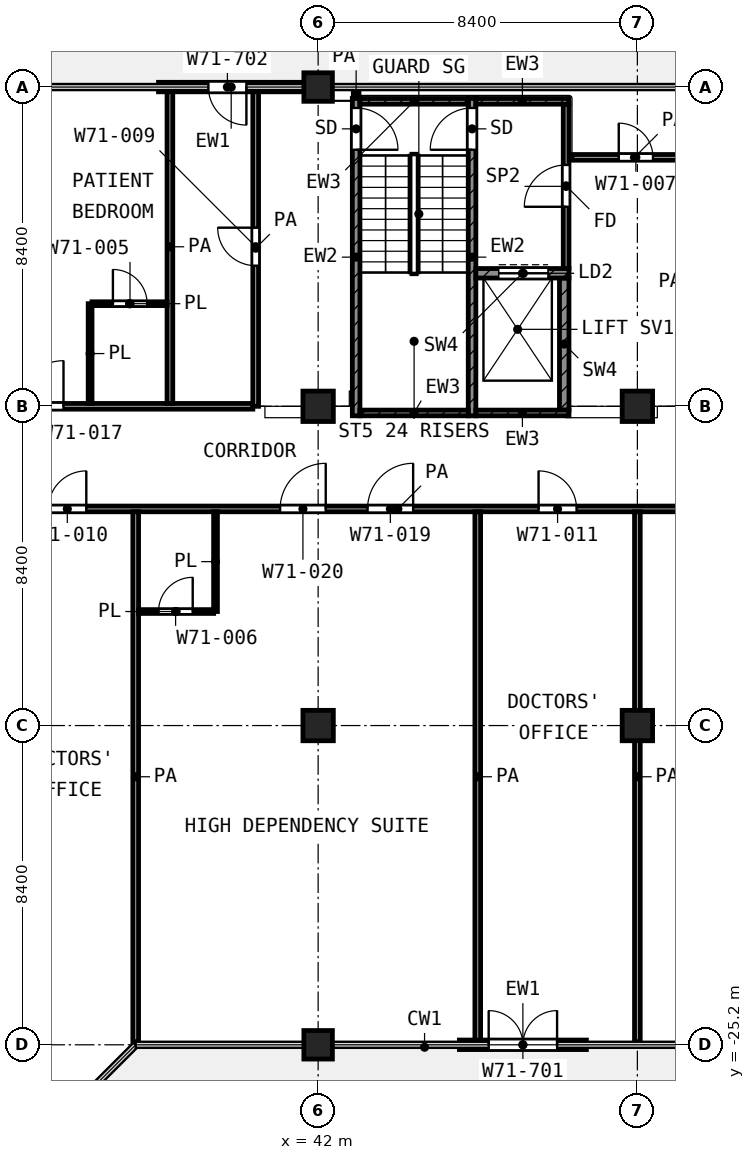
"""IFC4 building model, lengths in metres.
Left out: names, types, materials, properties, quantities, classifications, styles, units other than length and angle.
Written with IfcOpenShell. Run it as: python <this file> out.ifc"""

import sys

from ifc_helpers import new_model, si_unit, direction, frame, frame_2d, origin, origin_2d, place, context, subcontext, project, spatial, rectangle, extrude, element, fill, save


model = new_model("IFC4")
c1 = context("Model", 3, precision=1e-05, world=origin(), true_north=direction((0.0, 1.0)))
c2 = subcontext(c1, "Body", "Model", "MODEL_VIEW")
j1 = project(units=[si_unit("LENGTHUNIT", "METRE"), si_unit("PLANEANGLEUNIT", "RADIAN")], contexts=[c1])
p1 = place(None, origin())
s1 = spatial("IfcSite", under=j1, at=p1, CompositionType="ELEMENT")
p2 = place(p1, origin())
s2 = spatial("IfcBuilding", under=s1, at=p2, CompositionType="ELEMENT")
p3 = place(p2, frame((0.0, 0.0, 328.0)))
s3 = spatial("IfcBuildingStorey", under=s2, at=p3, CompositionType="ELEMENT", Elevation=328.0)
p4 = place(p3, frame((42.0, 0.0, 0.0), z_axis=(0.0, 0.0, 1.0), x_axis=(1.0, 0.0, 0.0)))
e1 = element("IfcColumn", 1, at=p4, inside=s3, PredefinedType="COLUMN", context=c2, shape_type="SweptSolid", body=[
    extrude(rectangle(XDim=0.75, YDim=0.75, at=origin_2d()), origin(), (0.0, 0.0, 1.0), 4.2),
])
for number, where, z_axis, x_axis in (
    (2, (42.0, -8.4, 0.0), (0.0, 0.0, 1.0), (1.0, 0.0, 0.0)),
    (3, (50.4, -8.4, 0.0), (0.0, 0.0, 1.0), (1.0, 0.0, 0.0)),
    (4, (42.0, -16.8, 0.0), (0.0, 0.0, 1.0), (1.0, 0.0, 0.0)),
    (5, (50.4, -16.8, 0.0), (0.0, 0.0, 1.0), (1.0, 0.0, 0.0)),
):
    element("IfcColumn", number, at=place(p3, frame(where, z_axis=z_axis, x_axis=x_axis)), inside=s3, PredefinedType="COLUMN", context=c2, shape_type="SweptSolid", body=[
        extrude(rectangle(XDim=0.8, YDim=0.8, at=origin_2d()), origin(), (0.0, 0.0, 1.0), 4.2),
    ])
p5 = place(p3, frame((42.0, -25.2, 0.0), z_axis=(0.0, 0.0, 1.0), x_axis=(1.0, 0.0, 0.0)))
e6 = element("IfcColumn", 6, at=p5, inside=s3, PredefinedType="COLUMN", context=c2, shape_type="SweptSolid", body=[
    extrude(rectangle(XDim=0.75, YDim=0.75, at=origin_2d()), origin(), (0.0, 0.0, 1.0), 4.2),
])
p6 = place(p3, frame((45.717, -25.2, 0.0), z_axis=(0.0, 0.0, 1.0), x_axis=(1.0, 0.0, 0.0)))
e7 = element("IfcWall", 7, at=p6, inside=s3, PredefinedType="SOLIDWALL", context=c2, shape_type="SweptSolid", body=[
    extrude(rectangle(XDim=3.342, YDim=0.25, at=frame_2d((1.671, 0.0))), origin(), (0.0, 0.0, 1.0), 3.66),
])
p7 = place(p6, frame((0.771, 0.0, 0.0)))
e8 = element("IfcOpeningElement", 8, at=p7, cuts=e7, PredefinedType="OPENING", context=c2, shape_type="SweptSolid", body=[
    extrude(rectangle(XDim=1.8, YDim=2.1, at=frame_2d((0.9, 1.05))), frame((0.0, 0.135, 0.0), z_axis=(0.0, -1.0, 0.0), x_axis=(1.0, 0.0, 0.0)), (0.0, 0.0, 1.0), 0.27),
])
p8 = place(p3, frame((41.625, 0.0, 0.0), z_axis=(0.0, 0.0, 1.0), x_axis=(-1.0, 0.0, 0.0)))
e9 = element("IfcWall", 9, at=p8, inside=s3, PredefinedType="SOLIDWALL", context=c2, shape_type="SweptSolid", body=[
    extrude(rectangle(XDim=3.825, YDim=0.25, at=frame_2d((1.913, 0.0))), origin(), (0.0, 0.0, 1.0), 3.66),
])
p9 = place(p8, frame((1.512, 0.0, 0.0)))
e10 = element("IfcOpeningElement", 10, at=p9, cuts=e9, PredefinedType="OPENING", context=c2, shape_type="SweptSolid", body=[
    extrude(rectangle(XDim=1.0, YDim=2.1, at=frame_2d((0.5, 1.05))), frame((0.0, 0.135, 0.0), z_axis=(0.0, -1.0, 0.0), x_axis=(1.0, 0.0, 0.0)), (0.0, 0.0, 1.0), 0.27),
])
p10 = place(p3, frame((43.0, -8.65, 0.0), z_axis=(0.0, 0.0, 1.0), x_axis=(0.0, 1.0, 0.0)))
e11 = element("IfcWall", 11, at=p10, inside=s3, PredefinedType="SHEAR", context=c2, shape_type="SweptSolid", body=[
    extrude(rectangle(XDim=8.35, YDim=0.2, at=frame_2d((4.175, 0.0))), origin(), (0.0, 0.0, 1.0), 3.78),
])
p11 = place(p10, frame((7.0, 0.0, 0.0)))
e12 = element("IfcOpeningElement", 12, at=p11, cuts=e11, PredefinedType="OPENING", context=c2, shape_type="SweptSolid", body=[
    extrude(rectangle(XDim=1.1, YDim=2.1, at=frame_2d((0.55, 1.05))), frame((0.0, 0.11, 0.0), z_axis=(0.0, -1.0, 0.0), x_axis=(1.0, 0.0, 0.0)), (0.0, 0.0, 1.0), 0.22),
])
p12 = place(p3, frame((46.05, -8.65, 0.0), z_axis=(0.0, 0.0, 1.0), x_axis=(0.0, 1.0, 0.0)))
e13 = element("IfcWall", 13, at=p12, inside=s3, PredefinedType="SHEAR", context=c2, shape_type="SweptSolid", body=[
    extrude(rectangle(XDim=8.35, YDim=0.2, at=frame_2d((4.175, 0.0))), origin(), (0.0, 0.0, 1.0), 3.78),
])
p13 = place(p12, frame((7.0, 0.0, 0.0)))
e14 = element("IfcOpeningElement", 14, at=p13, cuts=e13, PredefinedType="OPENING", context=c2, shape_type="SweptSolid", body=[
    extrude(rectangle(XDim=1.1, YDim=2.1, at=frame_2d((0.55, 1.05))), frame((0.0, 0.11, 0.0), z_axis=(0.0, -1.0, 0.0), x_axis=(1.0, 0.0, 0.0)), (0.0, 0.0, 1.0), 0.22),
])
p14 = place(p3, frame((43.1, -0.375, 0.0), z_axis=(0.0, 0.0, 1.0), x_axis=(1.0, 0.0, 0.0)))
e15 = element("IfcWall", 15, at=p14, inside=s3, PredefinedType="SHEAR", context=c2, shape_type="SweptSolid", body=[
    extrude(rectangle(XDim=2.85, YDim=0.15, at=frame_2d((1.425, 0.0))), origin(), (0.0, 0.0, 1.0), 3.78),
])
p15 = place(p3, frame((46.15, -0.375, 0.0), z_axis=(0.0, 0.0, 1.0), x_axis=(1.0, 0.0, 0.0)))
e16 = element("IfcWall", 16, at=p15, inside=s3, PredefinedType="SHEAR", context=c2, shape_type="SweptSolid", body=[
    extrude(rectangle(XDim=2.45, YDim=0.15, at=frame_2d((1.225, 0.0))), origin(), (0.0, 0.0, 1.0), 3.78),
])
p16 = place(p3, frame((43.1, -8.575, 0.0), z_axis=(0.0, 0.0, 1.0), x_axis=(1.0, 0.0, 0.0)))
e17 = element("IfcWall", 17, at=p16, inside=s3, PredefinedType="SHEAR", context=c2, shape_type="SweptSolid", body=[
    extrude(rectangle(XDim=2.85, YDim=0.15, at=frame_2d((1.425, 0.0))), origin(), (0.0, 0.0, 1.0), 3.78),
])
p17 = place(p3, frame((46.15, -8.575, 0.0), z_axis=(0.0, 0.0, 1.0), x_axis=(1.0, 0.0, 0.0)))
e18 = element("IfcWall", 18, at=p17, inside=s3, PredefinedType="SHEAR", context=c2, shape_type="SweptSolid", body=[
    extrude(rectangle(XDim=2.45, YDim=0.15, at=frame_2d((1.225, 0.0))), origin(), (0.0, 0.0, 1.0), 3.78),
])
p18 = place(p3, frame((46.15, -4.9, 0.0), z_axis=(0.0, 0.0, 1.0), x_axis=(1.0, 0.0, 0.0)))
e19 = element("IfcWall", 19, at=p18, inside=s3, PredefinedType="SHEAR", context=c2, shape_type="SweptSolid", body=[
    extrude(rectangle(XDim=2.45, YDim=0.25, at=frame_2d((1.225, 0.0))), origin(), (0.0, 0.0, 1.0), 3.78),
])
p19 = place(p18, frame((0.6, 0.0, 0.0)))
e20 = element("IfcOpeningElement", 20, at=p19, cuts=e19, PredefinedType="OPENING", context=c2, shape_type="SweptSolid", body=[
    extrude(rectangle(XDim=1.3, YDim=2.1, at=frame_2d((0.65, 1.05))), frame((0.0, 0.135, 0.0), z_axis=(0.0, -1.0, 0.0), x_axis=(1.0, 0.0, 0.0)), (0.0, 0.0, 1.0), 0.27),
])
p20 = place(p3, frame((48.475, -8.5, 0.0), z_axis=(0.0, 0.0, 1.0), x_axis=(0.0, 1.0, 0.0)))
e21 = element("IfcWall", 21, at=p20, inside=s3, PredefinedType="SHEAR", context=c2, shape_type="SweptSolid", body=[
    extrude(rectangle(XDim=3.475, YDim=0.25, at=frame_2d((1.738, 0.0))), origin(), (0.0, 0.0, 1.0), 3.78),
])
p21 = place(p3, frame((48.525, -4.775, 0.0), z_axis=(0.0, 0.0, 1.0), x_axis=(0.0, 1.0, 0.0)))
e22 = element("IfcWall", 22, at=p21, inside=s3, PredefinedType="PARTITIONING", context=c2, shape_type="SweptSolid", body=[
    extrude(rectangle(XDim=4.325, YDim=0.15, at=frame_2d((2.163, 0.0))), origin(), (0.0, 0.0, 1.0), 3.78),
])
p22 = place(p21, frame((1.625, 0.0, 0.0)))
e23 = element("IfcOpeningElement", 23, at=p22, cuts=e22, PredefinedType="OPENING", context=c2, shape_type="SweptSolid", body=[
    extrude(rectangle(XDim=1.1, YDim=2.1, at=frame_2d((0.55, 1.05))), frame((0.0, 0.085, 0.0), z_axis=(0.0, -1.0, 0.0), x_axis=(1.0, 0.0, 0.0)), (0.0, 0.0, 1.0), 0.17),
])
p23 = place(p3, frame((37.275, -13.8, 0.0), z_axis=(0.0, 0.0, 1.0), x_axis=(1.0, 0.0, 0.0)))
e24 = element("IfcWall", 24, at=p23, inside=s3, PredefinedType="PARTITIONING", context=c2, shape_type="SweptSolid", body=[
    extrude(rectangle(XDim=1.975, YDim=0.1, at=frame_2d((0.988, 0.0))), origin(), (0.0, 0.0, 1.0), 3.78),
])
p24 = place(p23, frame((0.525, 0.0, 0.0)))
e25 = element("IfcOpeningElement", 25, at=p24, cuts=e24, PredefinedType="OPENING", context=c2, shape_type="SweptSolid", body=[
    extrude(rectangle(XDim=0.9, YDim=2.1, at=frame_2d((0.45, 1.05))), frame((0.0, 0.06, 0.0), z_axis=(0.0, -1.0, 0.0), x_axis=(1.0, 0.0, 0.0)), (0.0, 0.0, 1.0), 0.12),
])
p25 = place(p3, frame((36.05, -5.7, 0.0), z_axis=(0.0, 0.0, 1.0), x_axis=(1.0, 0.0, 0.0)))
e26 = element("IfcWall", 26, at=p25, inside=s3, PredefinedType="PARTITIONING", context=c2, shape_type="SweptSolid", body=[
    extrude(rectangle(XDim=1.975, YDim=0.1, at=frame_2d((0.987, 0.0))), origin(), (0.0, 0.0, 1.0), 3.78),
])
p26 = place(p25, frame((0.55, 0.0, 0.0)))
e27 = element("IfcOpeningElement", 27, at=p26, cuts=e26, PredefinedType="OPENING", context=c2, shape_type="SweptSolid", body=[
    extrude(rectangle(XDim=0.9, YDim=2.1, at=frame_2d((0.45, 1.05))), frame((0.0, 0.06, 0.0), z_axis=(0.0, -1.0, 0.0), x_axis=(1.0, 0.0, 0.0)), (0.0, 0.0, 1.0), 0.12),
])
for number, where, z_axis, x_axis in (
    (28, (36.0, -8.325, 0.0), (0.0, 0.0, 1.0), (0.0, 1.0, 0.0)),
    (29, (39.3, -13.8, 0.0), (0.0, 0.0, 1.0), (0.0, 1.0, 0.0)),
):
    element("IfcWall", number, at=place(p3, frame(where, z_axis=z_axis, x_axis=x_axis)), inside=s3, PredefinedType="PARTITIONING", context=c2, shape_type="SweptSolid", body=[
        extrude(rectangle(XDim=2.625, YDim=0.1, at=frame_2d((1.312, 0.0))), origin(), (0.0, 0.0, 1.0), 3.78),
    ])
p27 = place(p3, frame((29.475, -11.1, 0.0), z_axis=(0.0, 0.0, 1.0), x_axis=(1.0, 0.0, 0.0)))
e30 = element("IfcWall", 30, at=p27, inside=s3, PredefinedType="PARTITIONING", context=c2, shape_type="SweptSolid", body=[
    extrude(rectangle(XDim=29.245, YDim=0.15, at=frame_2d((14.623, 0.0))), origin(), (0.0, 0.0, 1.0), 3.78),
])
p28 = place(p27, frame((1.425, 0.0, 0.0)))
e31 = element("IfcOpeningElement", 31, at=p28, cuts=e30, PredefinedType="OPENING", context=c2, shape_type="SweptSolid", body=[
    extrude(rectangle(XDim=1.2, YDim=2.1, at=frame_2d((0.6, 1.05))), frame((0.0, 0.085, 0.0), z_axis=(0.0, -1.0, 0.0), x_axis=(1.0, 0.0, 0.0)), (0.0, 0.0, 1.0), 0.17),
])
p29 = place(p27, frame((5.425, 0.0, 0.0)))
e32 = element("IfcOpeningElement", 32, at=p29, cuts=e30, PredefinedType="OPENING", context=c2, shape_type="SweptSolid", body=[
    extrude(rectangle(XDim=1.0, YDim=2.1, at=frame_2d((0.5, 1.05))), frame((0.0, 0.085, 0.0), z_axis=(0.0, -1.0, 0.0), x_axis=(1.0, 0.0, 0.0)), (0.0, 0.0, 1.0), 0.17),
])
p30 = place(p27, frame((13.825, 0.0, 0.0)))
e33 = element("IfcOpeningElement", 33, at=p30, cuts=e30, PredefinedType="OPENING", context=c2, shape_type="SweptSolid", body=[
    extrude(rectangle(XDim=1.2, YDim=2.1, at=frame_2d((0.6, 1.05))), frame((0.0, 0.085, 0.0), z_axis=(0.0, -1.0, 0.0), x_axis=(1.0, 0.0, 0.0)), (0.0, 0.0, 1.0), 0.17),
])
p31 = place(p27, frame((11.525, 0.0, 0.0)))
e34 = element("IfcOpeningElement", 34, at=p31, cuts=e30, PredefinedType="OPENING", context=c2, shape_type="SweptSolid", body=[
    extrude(rectangle(XDim=1.2, YDim=2.1, at=frame_2d((0.6, 1.05))), frame((0.0, 0.085, 0.0), z_axis=(0.0, -1.0, 0.0), x_axis=(1.0, 0.0, 0.0)), (0.0, 0.0, 1.0), 0.17),
])
p32 = place(p27, frame((18.325, 0.0, 0.0)))
e35 = element("IfcOpeningElement", 35, at=p32, cuts=e30, PredefinedType="OPENING", context=c2, shape_type="SweptSolid", body=[
    extrude(rectangle(XDim=1.0, YDim=2.1, at=frame_2d((0.5, 1.05))), frame((0.0, 0.085, 0.0), z_axis=(0.0, -1.0, 0.0), x_axis=(1.0, 0.0, 0.0)), (0.0, 0.0, 1.0), 0.17),
])
p33 = place(p27, frame((24.375, 0.0, 0.0)))
e36 = element("IfcOpeningElement", 36, at=p33, cuts=e30, PredefinedType="OPENING", context=c2, shape_type="SweptSolid", body=[
    extrude(rectangle(XDim=1.5, YDim=2.1, at=frame_2d((0.75, 1.05))), frame((0.0, 0.085, 0.0), z_axis=(0.0, -1.0, 0.0), x_axis=(1.0, 0.0, 0.0)), (0.0, 0.0, 1.0), 0.17),
])
p34 = place(p3, frame((24.7, -8.4, 0.0), z_axis=(0.0, 0.0, 1.0), x_axis=(1.0, 0.0, 0.0)))
e37 = element("IfcWall", 37, at=p34, inside=s3, PredefinedType="PARTITIONING", context=c2, shape_type="SweptSolid", body=[
    extrude(rectangle(XDim=15.582, YDim=0.15, at=frame_2d((7.791, 0.0))), origin(), (0.0, 0.0, 1.0), 3.78),
])
p35 = place(p34, frame((1.85, 0.0, 0.0)))
e38 = element("IfcOpeningElement", 38, at=p35, cuts=e37, PredefinedType="OPENING", context=c2, shape_type="SweptSolid", body=[
    extrude(rectangle(XDim=1.2, YDim=2.1, at=frame_2d((0.6, 1.05))), frame((0.0, 0.085, 0.0), z_axis=(0.0, -1.0, 0.0), x_axis=(1.0, 0.0, 0.0)), (0.0, 0.0, 1.0), 0.17),
])
p36 = place(p34, frame((6.7, 0.0, 0.0)))
e39 = element("IfcOpeningElement", 39, at=p36, cuts=e37, PredefinedType="OPENING", context=c2, shape_type="SweptSolid", body=[
    extrude(rectangle(XDim=1.2, YDim=2.1, at=frame_2d((0.6, 1.05))), frame((0.0, 0.085, 0.0), z_axis=(0.0, -1.0, 0.0), x_axis=(1.0, 0.0, 0.0)), (0.0, 0.0, 1.0), 0.17),
])
p37 = place(p34, frame((9.4, 0.0, 0.0)))
e40 = element("IfcOpeningElement", 40, at=p37, cuts=e37, PredefinedType="OPENING", context=c2, shape_type="SweptSolid", body=[
    extrude(rectangle(XDim=1.2, YDim=2.1, at=frame_2d((0.6, 1.05))), frame((0.0, 0.085, 0.0), z_axis=(0.0, -1.0, 0.0), x_axis=(1.0, 0.0, 0.0)), (0.0, 0.0, 1.0), 0.17),
])
p38 = place(p3, frame((48.68, -1.85, 0.0), z_axis=(0.0, 0.0, 1.0), x_axis=(1.0, 0.0, 0.0)))
e41 = element("IfcWall", 41, at=p38, inside=s3, PredefinedType="PARTITIONING", context=c2, shape_type="SweptSolid", body=[
    extrude(rectangle(XDim=3.286, YDim=0.15, at=frame_2d((1.643, 0.0))), origin(), (0.0, 0.0, 1.0), 3.78),
])
p39 = place(p38, frame((1.23, 0.0, 0.0)))
e42 = element("IfcOpeningElement", 42, at=p39, cuts=e41, PredefinedType="OPENING", context=c2, shape_type="SweptSolid", body=[
    extrude(rectangle(XDim=0.9, YDim=2.1, at=frame_2d((0.45, 1.05))), frame((0.0, 0.085, 0.0), z_axis=(0.0, -1.0, 0.0), x_axis=(1.0, 0.0, 0.0)), (0.0, 0.0, 1.0), 0.17),
])
p40 = place(p3, frame((37.2, -25.12, 0.0), z_axis=(0.0, 0.0, 1.0), x_axis=(0.0, 1.0, 0.0)))
e43 = element("IfcWall", 43, at=p40, inside=s3, PredefinedType="PARTITIONING", context=c2, shape_type="SweptSolid", body=[
    extrude(rectangle(XDim=13.945, YDim=0.15, at=frame_2d((6.973, 0.0))), origin(), (0.0, 0.0, 1.0), 3.78),
])
p41 = place(p3, frame((38.1, -8.325, 0.0), z_axis=(0.0, 0.0, 1.0), x_axis=(0.0, 1.0, 0.0)))
e44 = element("IfcWall", 44, at=p41, inside=s3, PredefinedType="PARTITIONING", context=c2, shape_type="SweptSolid", body=[
    extrude(rectangle(XDim=8.245, YDim=0.15, at=frame_2d((4.123, 0.0))), origin(), (0.0, 0.0, 1.0), 3.78),
])
p42 = place(p3, frame((40.357, -8.4, 0.0), z_axis=(0.0, 0.0, 1.0), x_axis=(0.0, 1.0, 0.0)))
e45 = element("IfcWall", 45, at=p42, inside=s3, PredefinedType="PARTITIONING", context=c2, shape_type="SweptSolid", body=[
    extrude(rectangle(XDim=8.32, YDim=0.15, at=frame_2d((4.16, 0.0))), origin(), (0.0, 0.0, 1.0), 3.78),
])
p43 = place(p42, frame((3.7, 0.0, 0.0)))
e46 = element("IfcOpeningElement", 46, at=p43, cuts=e45, PredefinedType="OPENING", context=c2, shape_type="SweptSolid", body=[
    extrude(rectangle(XDim=1.0, YDim=2.1, at=frame_2d((0.5, 1.05))), frame((0.0, 0.085, 0.0), z_axis=(0.0, -1.0, 0.0), x_axis=(1.0, 0.0, 0.0)), (0.0, 0.0, 1.0), 0.17),
])
p44 = place(p3, frame((43.0, -0.27, 0.0), z_axis=(0.0, 0.0, 1.0), x_axis=(0.0, 1.0, 0.0)))
e47 = element("IfcWall", 47, at=p44, inside=s3, PredefinedType="PARTITIONING", context=c2, shape_type="SweptSolid", body=[
    extrude(rectangle(XDim=0.19, YDim=0.15, at=frame_2d((0.095, 0.0))), origin(), (0.0, 0.0, 1.0), 3.78),
])
for number, where, z_axis, x_axis in (
    (48, (46.2, -25.12, 0.0), (0.0, 0.0, 1.0), (0.0, 1.0, 0.0)),
    (49, (50.4, -25.12, 0.0), (0.0, 0.0, 1.0), (0.0, 1.0, 0.0)),
):
    element("IfcWall", number, at=place(p3, frame(where, z_axis=z_axis, x_axis=x_axis)), inside=s3, PredefinedType="PARTITIONING", context=c2, shape_type="SweptSolid", body=[
        extrude(rectangle(XDim=13.945, YDim=0.15, at=frame_2d((6.973, 0.0))), origin(), (0.0, 0.0, 1.0), 3.78),
    ])
p45 = place(p7, origin())
e50 = element("IfcDoor", 50, at=p45, inside=s3, OperationType="DOUBLE_DOOR_SINGLE_SWING", PredefinedType="DOOR", context=c2, shape_type="SweptSolid", body=[
    extrude(rectangle(XDim=1.8, YDim=2.1, at=frame_2d((0.9, 1.05))), frame((0.0, 0.025, 0.0), z_axis=(0.0, -1.0, 0.0), x_axis=(1.0, 0.0, 0.0)), (0.0, 0.0, 1.0), 0.05),
])
fill(e8, e50)
p46 = place(p9, origin())
e51 = element("IfcDoor", 51, at=p46, inside=s3, OperationType="SINGLE_SWING_LEFT", PredefinedType="DOOR", context=c2, shape_type="SweptSolid", body=[
    extrude(rectangle(XDim=1.0, YDim=2.1, at=frame_2d((0.5, 1.05))), frame((0.0, 0.025, 0.0), z_axis=(0.0, -1.0, 0.0), x_axis=(1.0, 0.0, 0.0)), (0.0, 0.0, 1.0), 0.05),
])
fill(e10, e51)
p47 = place(p11, frame((1.1, 0.0, 0.0), z_axis=(0.0, 0.0, 1.0), x_axis=(-1.0, 0.0, 0.0)))
e52 = element("IfcDoor", 52, at=p47, inside=s3, OperationType="SINGLE_SWING_LEFT", PredefinedType="DOOR", context=c2, shape_type="SweptSolid", body=[
    extrude(rectangle(XDim=1.1, YDim=2.1, at=frame_2d((0.55, 1.05))), frame((0.0, 0.025, 0.0), z_axis=(0.0, -1.0, 0.0), x_axis=(1.0, 0.0, 0.0)), (0.0, 0.0, 1.0), 0.05),
])
fill(e12, e52)
p48 = place(p13, origin())
e53 = element("IfcDoor", 53, at=p48, inside=s3, OperationType="SINGLE_SWING_LEFT", PredefinedType="DOOR", context=c2, shape_type="SweptSolid", body=[
    extrude(rectangle(XDim=1.1, YDim=2.1, at=frame_2d((0.55, 1.05))), frame((0.0, 0.025, 0.0), z_axis=(0.0, -1.0, 0.0), x_axis=(1.0, 0.0, 0.0)), (0.0, 0.0, 1.0), 0.05),
])
fill(e14, e53)
p49 = place(p19, origin())
e54 = element("IfcDoor", 54, at=p49, inside=s3, OperationType="DOUBLE_DOOR_SLIDING", PredefinedType="DOOR", context=c2, shape_type="SweptSolid", body=[
    extrude(rectangle(XDim=1.3, YDim=2.1, at=frame_2d((0.65, 1.05))), frame((0.0, 0.025, 0.0), z_axis=(0.0, -1.0, 0.0), x_axis=(1.0, 0.0, 0.0)), (0.0, 0.0, 1.0), 0.05),
])
fill(e20, e54)
p50 = place(p22, origin())
e55 = element("IfcDoor", 55, at=p50, inside=s3, OperationType="SINGLE_SWING_LEFT", PredefinedType="DOOR", context=c2, shape_type="SweptSolid", body=[
    extrude(rectangle(XDim=1.1, YDim=2.1, at=frame_2d((0.55, 1.05))), frame((0.0, 0.025, 0.0), z_axis=(0.0, -1.0, 0.0), x_axis=(1.0, 0.0, 0.0)), (0.0, 0.0, 1.0), 0.05),
])
fill(e23, e55)
p51 = place(p37, origin())
e56 = element("IfcDoor", 56, at=p51, inside=s3, OperationType="SINGLE_SWING_RIGHT", PredefinedType="DOOR", context=c2, shape_type="SweptSolid", body=[
    extrude(rectangle(XDim=1.2, YDim=2.1, at=frame_2d((0.6, 1.05))), frame((0.0, 0.025, 0.0), z_axis=(0.0, -1.0, 0.0), x_axis=(1.0, 0.0, 0.0)), (0.0, 0.0, 1.0), 0.05),
])
fill(e40, e56)
p52 = place(p26, origin())
e57 = element("IfcDoor", 57, at=p52, inside=s3, OperationType="SINGLE_SWING_LEFT", PredefinedType="DOOR", context=c2, shape_type="SweptSolid", body=[
    extrude(rectangle(XDim=0.9, YDim=2.1, at=frame_2d((0.45, 1.05))), frame((0.0, 0.025, 0.0), z_axis=(0.0, -1.0, 0.0), x_axis=(1.0, 0.0, 0.0)), (0.0, 0.0, 1.0), 0.05),
])
fill(e27, e57)
p53 = place(p43, origin())
e58 = element("IfcDoor", 58, at=p53, inside=s3, OperationType="SINGLE_SWING_RIGHT", PredefinedType="DOOR", context=c2, shape_type="SweptSolid", body=[
    extrude(rectangle(XDim=1.0, YDim=2.1, at=frame_2d((0.5, 1.05))), frame((0.0, 0.025, 0.0), z_axis=(0.0, -1.0, 0.0), x_axis=(1.0, 0.0, 0.0)), (0.0, 0.0, 1.0), 0.05),
])
fill(e46, e58)
p54 = place(p29, origin())
e59 = element("IfcDoor", 59, at=p54, inside=s3, OperationType="SINGLE_SWING_RIGHT", PredefinedType="DOOR", context=c2, shape_type="SweptSolid", body=[
    extrude(rectangle(XDim=1.0, YDim=2.1, at=frame_2d((0.5, 1.05))), frame((0.0, 0.025, 0.0), z_axis=(0.0, -1.0, 0.0), x_axis=(1.0, 0.0, 0.0)), (0.0, 0.0, 1.0), 0.05),
])
fill(e32, e59)
p55 = place(p30, origin())
e60 = element("IfcDoor", 60, at=p55, inside=s3, OperationType="SINGLE_SWING_RIGHT", PredefinedType="DOOR", context=c2, shape_type="SweptSolid", body=[
    extrude(rectangle(XDim=1.2, YDim=2.1, at=frame_2d((0.6, 1.05))), frame((0.0, 0.025, 0.0), z_axis=(0.0, -1.0, 0.0), x_axis=(1.0, 0.0, 0.0)), (0.0, 0.0, 1.0), 0.05),
])
fill(e33, e60)
p56 = place(p31, origin())
e61 = element("IfcDoor", 61, at=p56, inside=s3, OperationType="SINGLE_SWING_RIGHT", PredefinedType="DOOR", context=c2, shape_type="SweptSolid", body=[
    extrude(rectangle(XDim=1.2, YDim=2.1, at=frame_2d((0.6, 1.05))), frame((0.0, 0.025, 0.0), z_axis=(0.0, -1.0, 0.0), x_axis=(1.0, 0.0, 0.0)), (0.0, 0.0, 1.0), 0.05),
])
fill(e34, e61)
p57 = place(p24, origin())
e62 = element("IfcDoor", 62, at=p57, inside=s3, OperationType="SINGLE_SWING_RIGHT", PredefinedType="DOOR", context=c2, shape_type="SweptSolid", body=[
    extrude(rectangle(XDim=0.9, YDim=2.1, at=frame_2d((0.45, 1.05))), frame((0.0, 0.025, 0.0), z_axis=(0.0, -1.0, 0.0), x_axis=(1.0, 0.0, 0.0)), (0.0, 0.0, 1.0), 0.05),
])
fill(e25, e62)
p58 = place(p32, origin())
e63 = element("IfcDoor", 63, at=p58, inside=s3, OperationType="SINGLE_SWING_LEFT", PredefinedType="DOOR", context=c2, shape_type="SweptSolid", body=[
    extrude(rectangle(XDim=1.0, YDim=2.1, at=frame_2d((0.5, 1.05))), frame((0.0, 0.025, 0.0), z_axis=(0.0, -1.0, 0.0), x_axis=(1.0, 0.0, 0.0)), (0.0, 0.0, 1.0), 0.05),
])
fill(e35, e63)
p59 = place(p39, origin())
e64 = element("IfcDoor", 64, at=p59, inside=s3, OperationType="SINGLE_SWING_LEFT", PredefinedType="DOOR", context=c2, shape_type="SweptSolid", body=[
    extrude(rectangle(XDim=0.9, YDim=2.1, at=frame_2d((0.45, 1.05))), frame((0.0, 0.025, 0.0), z_axis=(0.0, -1.0, 0.0), x_axis=(1.0, 0.0, 0.0)), (0.0, 0.0, 1.0), 0.05),
])
fill(e42, e64)
save(model, sys.argv[1])
